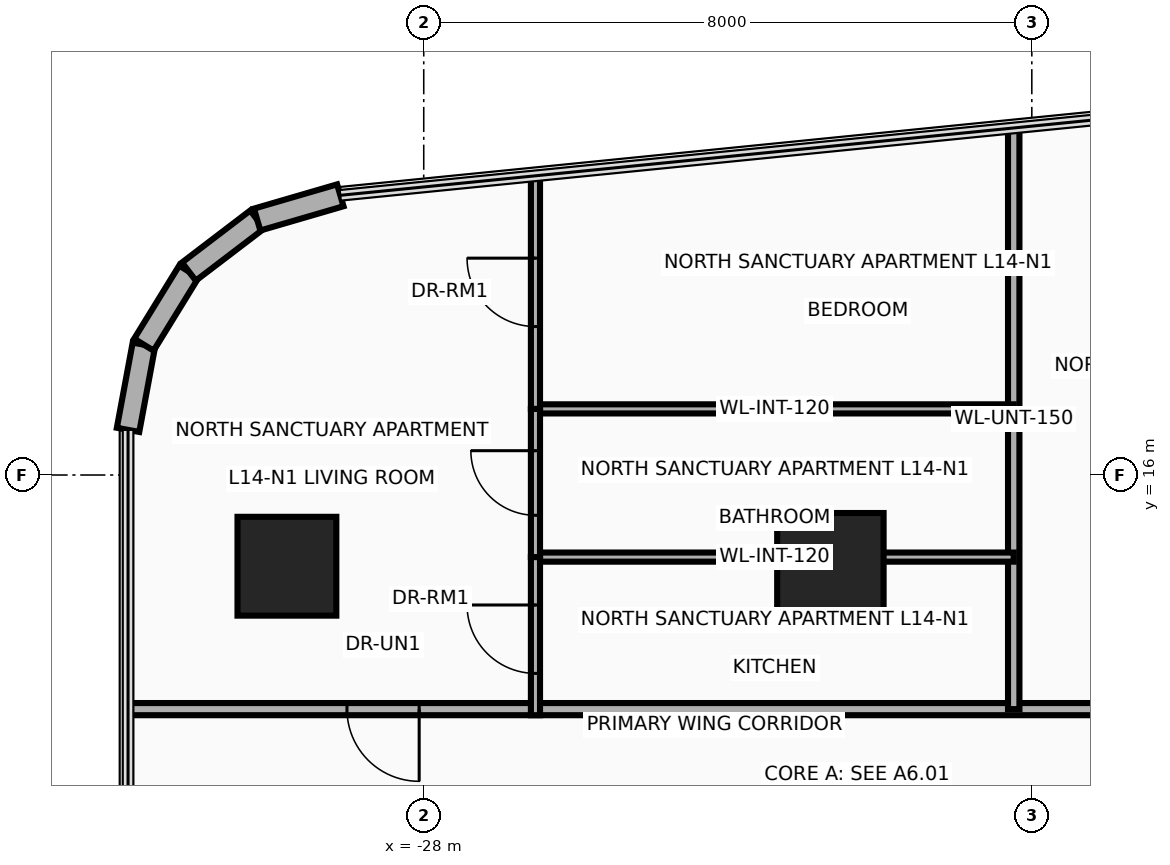
"""IFC4 building model, lengths in metres.
Left out: names, types, materials, properties, quantities, classifications, styles, units other than length and angle.
Written with IfcOpenShell. Run it as: python <this file> out.ifc"""

import sys

from ifc_helpers import new_model, si_unit, direction, frame, frame_2d, origin, origin_2d, place, context, subcontext, project, spatial, rectangle, circle, extrude, source, transform, mapped, element, fill, save


model = new_model("IFC4")
c1 = context("Model", 3, precision=1e-05, world=origin(), true_north=direction((0.0, 1.0)))
c2 = subcontext(c1, "Body", "Model", "MODEL_VIEW")
j1 = project(units=[si_unit("LENGTHUNIT", "METRE"), si_unit("PLANEANGLEUNIT", "RADIAN")], contexts=[c1])
p1 = place(None, origin())
s1 = spatial("IfcSite", under=j1, at=p1, CompositionType="ELEMENT")
p2 = place(p1, origin())
s2 = spatial("IfcBuilding", under=s1, at=p2, CompositionType="ELEMENT")
p3 = place(p2, frame((0.0, 0.0, 59.3)))
s3 = spatial("IfcBuildingStorey", under=s2, at=p3, CompositionType="ELEMENT", Elevation=59.3)
m1 = source(origin(), c2, "Body", "SweptSolid", [
    extrude(circle(Radius=0.65, at=origin_2d()), origin(), (0.0, 0.0, 1.0), 3.7),
])
p4 = place(p3, frame((-29.8, 14.8, 0.0), z_axis=(0.0, 0.0, 1.0), x_axis=(1.0, 0.0, 0.0)))
e1 = element("IfcColumn", 1, at=p4, inside=s3, PredefinedType="COLUMN", context=c2, shape_type="MappedRepresentation", body=[
    mapped(m1, transform((0.0, 0.0, 0.0), x_axis=(1.0, 0.0, 0.0), y_axis=(0.0, 1.0, 0.0), z_axis=(0.0, 0.0, 1.0), scale=1.0)),
])
m2 = source(origin(), c2, "Body", "SweptSolid", [
    extrude(rectangle(XDim=1.4, YDim=1.4, at=origin_2d()), origin(), (0.0, 0.0, 1.0), 3.7),
])
p5 = place(p3, frame((-22.65, 14.8, 0.0), z_axis=(0.0, 0.0, 1.0), x_axis=(1.0, 0.0, 0.0)))
e2 = element("IfcColumn", 2, at=p5, inside=s3, PredefinedType="COLUMN", context=c2, shape_type="MappedRepresentation", body=[
    mapped(m2, transform((0.0, 0.0, 0.0), x_axis=(1.0, 0.0, 0.0), y_axis=(0.0, 1.0, 0.0), z_axis=(0.0, 0.0, 1.0), scale=1.0)),
])
p6 = place(p3, frame((-31.89, 16.594, 0.0), z_axis=(0.0, 0.0, 1.0), x_axis=(0.182748995683, 0.9831596028, 0.0)))
e3 = element("IfcWall", 3, at=p6, inside=s3, PredefinedType="SOLIDWALL", context=c2, shape_type="SweptSolid", body=[
    extrude(rectangle(XDim=1.14, YDim=0.3, at=frame_2d((0.57, 0.0))), origin(), (0.0, 0.0, 1.0), 3.46),
])
p7 = place(p3, frame((-31.682, 17.714, 0.0), z_axis=(0.0, 0.0, 1.0), x_axis=(0.524157723014, 0.8516212077, 0.0)))
e4 = element("IfcWall", 4, at=p7, inside=s3, PredefinedType="SOLIDWALL", context=c2, shape_type="SweptSolid", body=[
    extrude(rectangle(XDim=1.129, YDim=0.3, at=frame_2d((0.565, 0.0))), origin(), (0.0, 0.0, 1.0), 3.46),
])
p8 = place(p3, frame((-31.09, 18.676, 0.0), z_axis=(0.0, 0.0, 1.0), x_axis=(0.795253002434, 0.606277710393, 0.0)))
e5 = element("IfcWall", 5, at=p8, inside=s3, PredefinedType="SOLIDWALL", context=c2, shape_type="SweptSolid", body=[
    extrude(rectangle(XDim=1.129, YDim=0.3, at=frame_2d((0.564, 0.0))), origin(), (0.0, 0.0, 1.0), 3.46),
])
p9 = place(p3, frame((-30.192, 19.361, 0.0), z_axis=(0.0, 0.0, 1.0), x_axis=(0.960071941549, 0.279753225271, 0.0)))
e6 = element("IfcWall", 6, at=p9, inside=s3, PredefinedType="SOLIDWALL", context=c2, shape_type="SweptSolid", body=[
    extrude(rectangle(XDim=1.14, YDim=0.3, at=frame_2d((0.57, 0.0))), origin(), (0.0, 0.0, 1.0), 3.46),
])
p10 = place(p3, frame((-31.89, 12.92, 0.0), z_axis=(0.0, 0.0, 1.0), x_axis=(1.0, 0.0, 0.0)))
e7 = element("IfcWall", 7, at=p10, inside=s3, PredefinedType="PARTITIONING", context=c2, shape_type="SweptSolid", body=[
    extrude(rectangle(XDim=45.44, YDim=0.16, at=frame_2d((22.72, 0.0))), origin(), (0.0, 0.0, 1.0), 2.583),
])
p11 = place(p10, frame((2.88, 0.0, 0.0)))
e8 = element("IfcOpeningElement", 8, at=p11, cuts=e7, PredefinedType="OPENING", context=c2, shape_type="SweptSolid", body=[
    extrude(rectangle(XDim=0.95, YDim=2.15, at=frame_2d((0.475, 1.075))), frame((0.0, 0.095, 0.0), z_axis=(0.0, -1.0, 0.0), x_axis=(1.0, 0.0, 0.0)), (0.0, 0.0, 1.0), 0.19),
])
p12 = place(p10, frame((13.768, 0.0, 0.0)))
e9 = element("IfcOpeningElement", 9, at=p12, cuts=e7, PredefinedType="OPENING", context=c2, shape_type="SweptSolid", body=[
    extrude(rectangle(XDim=0.95, YDim=2.15, at=frame_2d((0.475, 1.075))), frame((0.0, 0.095, 0.0), z_axis=(0.0, -1.0, 0.0), x_axis=(1.0, 0.0, 0.0)), (0.0, 0.0, 1.0), 0.19),
])
p13 = place(p10, frame((25.855, 0.0, 0.0)))
e10 = element("IfcOpeningElement", 10, at=p13, cuts=e7, PredefinedType="OPENING", context=c2, shape_type="SweptSolid", body=[
    extrude(rectangle(XDim=0.95, YDim=2.15, at=frame_2d((0.475, 1.075))), frame((0.0, 0.095, 0.0), z_axis=(0.0, -1.0, 0.0), x_axis=(1.0, 0.0, 0.0)), (0.0, 0.0, 1.0), 0.19),
])
p14 = place(p10, frame((36.292, 0.0, 0.0)))
e11 = element("IfcOpeningElement", 11, at=p14, cuts=e7, PredefinedType="OPENING", context=c2, shape_type="SweptSolid", body=[
    extrude(rectangle(XDim=0.95, YDim=2.15, at=frame_2d((0.475, 1.075))), frame((0.0, 0.095, 0.0), z_axis=(0.0, -1.0, 0.0), x_axis=(1.0, 0.0, 0.0)), (0.0, 0.0, 1.0), 0.19),
])
p15 = place(p3, frame((-20.238, 12.92, 0.0), z_axis=(0.0, 0.0, 1.0), x_axis=(0.0, 1.0, 0.0)))
e12 = element("IfcWall", 12, at=p15, inside=s3, PredefinedType="PARTITIONING", context=c2, shape_type="SweptSolid", body=[
    extrude(rectangle(XDim=7.646, YDim=0.15, at=frame_2d((3.823, 0.0))), origin(), (0.0, 0.0, 1.0), 2.583),
])
p16 = place(p3, frame((-26.53, 14.92, 0.0), z_axis=(0.0, 0.0, 1.0), x_axis=(1.0, 0.0, 0.0)))
e13 = element("IfcWall", 13, at=p16, inside=s3, PredefinedType="PARTITIONING", context=c2, shape_type="SweptSolid", body=[
    extrude(rectangle(XDim=6.292, YDim=0.12, at=frame_2d((3.146, 0.0))), origin(), (0.0, 0.0, 1.0), 2.583),
])
p17 = place(p3, frame((-26.53, 16.87, 0.0), z_axis=(0.0, 0.0, 1.0), x_axis=(1.0, 0.0, 0.0)))
e14 = element("IfcWall", 14, at=p17, inside=s3, PredefinedType="PARTITIONING", context=c2, shape_type="SweptSolid", body=[
    extrude(rectangle(XDim=6.292, YDim=0.12, at=frame_2d((3.146, 0.0))), origin(), (0.0, 0.0, 1.0), 3.46),
])
p18 = place(p3, frame((-26.53, 14.92, 0.0), z_axis=(0.0, 0.0, 1.0), x_axis=(0.0, 1.0, 0.0)))
e15 = element("IfcWall", 15, at=p18, inside=s3, PredefinedType="PARTITIONING", context=c2, shape_type="SweptSolid", body=[
    extrude(rectangle(XDim=1.95, YDim=0.12, at=frame_2d((0.975, 0.0))), origin(), (0.0, 0.0, 1.0), 2.583),
])
p19 = place(p18, frame((0.55, 0.0, 0.0)))
e16 = element("IfcOpeningElement", 16, at=p19, cuts=e15, PredefinedType="OPENING", context=c2, shape_type="SweptSolid", body=[
    extrude(rectangle(XDim=0.85, YDim=2.1, at=frame_2d((0.425, 1.05))), frame((0.0, 0.075, 0.0), z_axis=(0.0, -1.0, 0.0), x_axis=(1.0, 0.0, 0.0)), (0.0, 0.0, 1.0), 0.15),
])
p20 = place(p3, frame((-26.53, 12.84, 0.0), z_axis=(0.0, 0.0, 1.0), x_axis=(0.0, 1.0, 0.0)))
e17 = element("IfcWall", 17, at=p20, inside=s3, PredefinedType="PARTITIONING", context=c2, shape_type="SweptSolid", body=[
    extrude(rectangle(XDim=2.08, YDim=0.12, at=frame_2d((1.04, 0.0))), origin(), (0.0, 0.0, 1.0), 2.583),
])
p21 = place(p20, frame((0.55, 0.0, 0.0)))
e18 = element("IfcOpeningElement", 18, at=p21, cuts=e17, PredefinedType="OPENING", context=c2, shape_type="SweptSolid", body=[
    extrude(rectangle(XDim=0.9, YDim=2.1, at=frame_2d((0.45, 1.05))), frame((0.0, 0.075, 0.0), z_axis=(0.0, -1.0, 0.0), x_axis=(1.0, 0.0, 0.0)), (0.0, 0.0, 1.0), 0.15),
])
p22 = place(p3, frame((-26.53, 16.87, 0.0), z_axis=(0.0, 0.0, 1.0), x_axis=(0.0, 1.0, 0.0)))
e19 = element("IfcWall", 19, at=p22, inside=s3, PredefinedType="PARTITIONING", context=c2, shape_type="SweptSolid", body=[
    extrude(rectangle(XDim=3.066, YDim=0.12, at=frame_2d((1.533, 0.0))), origin(), (0.0, 0.0, 1.0), 3.46),
])
p23 = place(p22, frame((1.083, 0.0, 0.0)))
e20 = element("IfcOpeningElement", 20, at=p23, cuts=e19, PredefinedType="OPENING", context=c2, shape_type="SweptSolid", body=[
    extrude(rectangle(XDim=0.9, YDim=2.1, at=frame_2d((0.45, 1.05))), frame((0.0, 0.075, 0.0), z_axis=(0.0, -1.0, 0.0), x_axis=(1.0, 0.0, 0.0)), (0.0, 0.0, 1.0), 0.15),
])
p24 = place(p11, frame((0.95, 0.0, 0.0), z_axis=(0.0, 0.0, 1.0), x_axis=(-1.0, 0.0, 0.0)))
e21 = element("IfcDoor", 21, at=p24, inside=s3, OperationType="SINGLE_SWING_LEFT", PredefinedType="DOOR", context=c2, shape_type="SweptSolid", body=[
    extrude(rectangle(XDim=0.95, YDim=2.15, at=frame_2d((0.475, 1.075))), frame((0.0, 0.025, 0.0), z_axis=(0.0, -1.0, 0.0), x_axis=(1.0, 0.0, 0.0)), (0.0, 0.0, 1.0), 0.05),
])
fill(e8, e21)
p25 = place(p19, origin())
e22 = element("IfcDoor", 22, at=p25, inside=s3, OperationType="SINGLE_SWING_RIGHT", PredefinedType="DOOR", context=c2, shape_type="SweptSolid", body=[
    extrude(rectangle(XDim=0.85, YDim=2.1, at=frame_2d((0.425, 1.05))), frame((0.0, 0.025, 0.0), z_axis=(0.0, -1.0, 0.0), x_axis=(1.0, 0.0, 0.0)), (0.0, 0.0, 1.0), 0.05),
])
fill(e16, e22)
p26 = place(p21, origin())
e23 = element("IfcDoor", 23, at=p26, inside=s3, OperationType="SINGLE_SWING_LEFT", PredefinedType="DOOR", context=c2, shape_type="SweptSolid", body=[
    extrude(rectangle(XDim=0.9, YDim=2.1, at=frame_2d((0.45, 1.05))), frame((0.0, 0.025, 0.0), z_axis=(0.0, -1.0, 0.0), x_axis=(1.0, 0.0, 0.0)), (0.0, 0.0, 1.0), 0.05),
])
fill(e18, e23)
p27 = place(p23, origin())
e24 = element("IfcDoor", 24, at=p27, inside=s3, OperationType="SINGLE_SWING_RIGHT", PredefinedType="DOOR", context=c2, shape_type="SweptSolid", body=[
    extrude(rectangle(XDim=0.9, YDim=2.1, at=frame_2d((0.45, 1.05))), frame((0.0, 0.025, 0.0), z_axis=(0.0, -1.0, 0.0), x_axis=(1.0, 0.0, 0.0)), (0.0, 0.0, 1.0), 0.05),
])
fill(e20, e24)
save(model, sys.argv[1])
